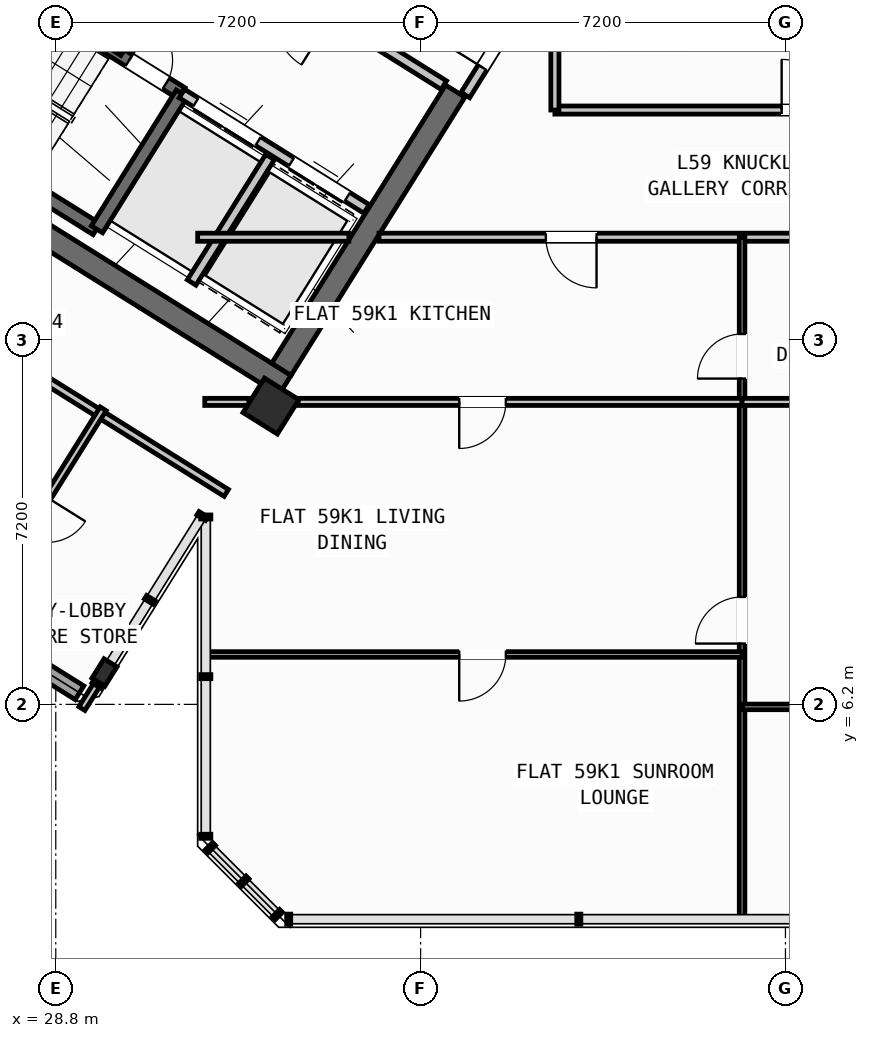
"""IFC4 building model, lengths in metres.
Left out: names, types, materials, properties, quantities, classifications, styles, units other than length and angle.
Written with IfcOpenShell. Run it as: python <this file> out.ifc"""

import sys

from ifc_helpers import new_model, si_unit, direction, frame, frame_2d, origin, origin_2d, place, context, subcontext, project, spatial, rectangle, hollow_rectangle, i_section, extrude, source, transform, mapped, element, fill, save


model = new_model("IFC4")
c1 = context("Model", 3, precision=1e-05, world=origin(), true_north=direction((0.0, 1.0)))
c2 = subcontext(c1, "Body", "Model", "MODEL_VIEW")
j1 = project(units=[si_unit("LENGTHUNIT", "METRE"), si_unit("PLANEANGLEUNIT", "RADIAN")], contexts=[c1])
p1 = place(None, origin())
s1 = spatial("IfcSite", under=j1, at=p1, CompositionType="ELEMENT")
p2 = place(p1, origin())
s2 = spatial("IfcBuilding", under=s1, at=p2, CompositionType="ELEMENT")
p3 = place(p2, frame((0.0, 0.0, 233.7)))
s3 = spatial("IfcBuildingStorey", under=s2, at=p3, CompositionType="ELEMENT", Elevation=233.7)
p4 = place(p3, frame((33.324, 12.503, 0.0), z_axis=(0.0, 0.0, 1.0), x_axis=(-0.848043529849, 0.529926571782, 0.0)))
e1 = element("IfcWall", 1, at=p4, inside=s3, PredefinedType="SHEAR", context=c2, shape_type="SweptSolid", body=[
    extrude(rectangle(XDim=13.04, YDim=0.45, at=frame_2d((6.52, 0.0))), origin(), (0.0, 0.0, 1.0), 4.55),
])
p5 = place(p3, frame((36.683, 18.304, 0.0), z_axis=(0.0, 0.0, 1.0), x_axis=(-0.529904039071, -0.848057609704, 0.0)))
e2 = element("IfcWall", 2, at=p5, inside=s3, PredefinedType="SHEAR", context=c2, shape_type="SweptSolid", body=[
    extrude(rectangle(XDim=6.475, YDim=0.45, at=frame_2d((3.238, 0.0))), origin(), (0.0, 0.0, 1.0), 4.55),
])
m1 = source(origin(), c2, "Body", "SweptSolid", [
    extrude(hollow_rectangle(XDim=0.8, YDim=0.8, WallThickness=0.032, at=origin_2d()), origin(), (0.0, 0.0, 1.0), 4.8),
])
p6 = place(p3, frame((33.046, 12.087, 0.0), z_axis=(0.0, 0.0, 1.0), x_axis=(-0.848048096156, 0.529919264233, 0.0)))
e3 = element("IfcColumn", 3, at=p6, inside=s3, PredefinedType="COLUMN", context=c2, shape_type="MappedRepresentation", body=[
    mapped(m1, transform((0.0, 0.0, 0.0), scale=1.0)),
])
m2 = source(origin(), c2, "Body", "SweptSolid", [
    extrude(i_section(OverallWidth=0.3, OverallDepth=0.45, WebThickness=0.014, FlangeThickness=0.026, at=origin_2d()), origin(), (0.0, 0.0, 1.0), 4.8),
])
p7 = place(p3, frame((29.761, 6.829, 0.0), z_axis=(0.0, 0.0, 1.0), x_axis=(-0.848048096156, 0.529919264233, 0.0)))
e4 = element("IfcColumn", 4, at=p7, inside=s3, PredefinedType="COLUMN", context=c2, shape_type="MappedRepresentation", body=[
    mapped(m2, transform((0.0, 0.0, 0.0), scale=1.0)),
])
p8 = place(p3, frame((29.268, 6.429, 0.0), z_axis=(0.0, 0.0, 1.0), x_axis=(-0.848049971435, 0.529916263149, 0.0)))
e5 = element("IfcWall", 5, at=p8, inside=s3, PredefinedType="STANDARD", context=c2, shape_type="SweptSolid", body=[
    extrude(rectangle(XDim=31.588, YDim=0.32, at=frame_2d((15.794, 0.0))), origin(), (0.0, 0.0, 1.0), 4.55),
])
p9 = place(p8, frame((15.901, 0.0, 0.0)))
e6 = element("IfcOpeningElement", 6, at=p9, cuts=e5, PredefinedType="OPENING", context=c2, shape_type="SweptSolid", body=[
    extrude(rectangle(XDim=1.2, YDim=2.15, at=frame_2d((0.6, 1.075))), frame((0.0, 0.17, 0.0), z_axis=(0.0, -1.0, 0.0), x_axis=(1.0, 0.0, 0.0)), (0.0, 0.0, 1.0), 0.34),
])
p10 = place(p8, frame((3.454, 0.0, 0.95)))
e7 = element("IfcOpeningElement", 7, at=p10, cuts=e5, PredefinedType="OPENING", context=c2, shape_type="SweptSolid", body=[
    extrude(rectangle(XDim=1.2, YDim=1.4, at=frame_2d((0.6, 0.7))), frame((0.0, 0.17, 0.0), z_axis=(0.0, -1.0, 0.0), x_axis=(1.0, 0.0, 0.0)), (0.0, 0.0, 1.0), 0.34),
])
p11 = place(p8, frame((7.561, 0.0, 0.85)))
e8 = element("IfcOpeningElement", 8, at=p11, cuts=e5, PredefinedType="OPENING", context=c2, shape_type="SweptSolid", body=[
    extrude(rectangle(XDim=1.8, YDim=1.5, at=frame_2d((0.9, 0.75))), frame((0.0, 0.17, 0.0), z_axis=(0.0, -1.0, 0.0), x_axis=(1.0, 0.0, 0.0)), (0.0, 0.0, 1.0), 0.34),
])
p12 = place(p8, frame((28.254, 0.0, 0.95)))
e9 = element("IfcOpeningElement", 9, at=p12, cuts=e5, PredefinedType="OPENING", context=c2, shape_type="SweptSolid", body=[
    extrude(rectangle(XDim=1.2, YDim=1.4, at=frame_2d((0.6, 0.7))), frame((0.0, 0.17, 0.0), z_axis=(0.0, -1.0, 0.0), x_axis=(1.0, 0.0, 0.0)), (0.0, 0.0, 1.0), 0.34),
])
p13 = place(p8, frame((19.234, 0.0, 1.0)))
e10 = element("IfcOpeningElement", 10, at=p13, cuts=e5, PredefinedType="OPENING", context=c2, shape_type="SweptSolid", body=[
    extrude(rectangle(XDim=0.9, YDim=1.25, at=frame_2d((0.45, 0.625))), frame((0.0, 0.17, 0.0), z_axis=(0.0, -1.0, 0.0), x_axis=(1.0, 0.0, 0.0)), (0.0, 0.0, 1.0), 0.34),
])
p14 = place(p8, frame((21.721, 0.0, 1.0)))
e11 = element("IfcOpeningElement", 11, at=p14, cuts=e5, PredefinedType="OPENING", context=c2, shape_type="SweptSolid", body=[
    extrude(rectangle(XDim=0.65, YDim=1.15, at=frame_2d((0.325, 0.575))), frame((0.0, 0.17, 0.0), z_axis=(0.0, -1.0, 0.0), x_axis=(1.0, 0.0, 0.0)), (0.0, 0.0, 1.0), 0.34),
])
p15 = place(p8, frame((23.631, 0.0, 1.0)))
e12 = element("IfcOpeningElement", 12, at=p15, cuts=e5, PredefinedType="OPENING", context=c2, shape_type="SweptSolid", body=[
    extrude(rectangle(XDim=0.9, YDim=1.25, at=frame_2d((0.45, 0.625))), frame((0.0, 0.17, 0.0), z_axis=(0.0, -1.0, 0.0), x_axis=(1.0, 0.0, 0.0)), (0.0, 0.0, 1.0), 0.34),
])
p16 = place(p8, frame((25.666, 0.0, 1.0)))
e13 = element("IfcOpeningElement", 13, at=p16, cuts=e5, PredefinedType="OPENING", context=c2, shape_type="SweptSolid", body=[
    extrude(rectangle(XDim=0.9, YDim=1.25, at=frame_2d((0.45, 0.625))), frame((0.0, 0.17, 0.0), z_axis=(0.0, -1.0, 0.0), x_axis=(1.0, 0.0, 0.0)), (0.0, 0.0, 1.0), 0.34),
])
p17 = place(p3, frame((29.605, 15.581, 0.0), z_axis=(0.0, 0.0, 1.0), x_axis=(-0.848036911448, 0.529937163087, 0.0)))
e14 = element("IfcWall", 14, at=p17, inside=s3, PredefinedType="SHEAR", context=c2, shape_type="SweptSolid", body=[
    extrude(rectangle(XDim=7.46, YDim=0.26, at=frame_2d((3.73, 0.0))), origin(), (0.0, 0.0, 1.0), 4.55),
])
p18 = place(p3, frame((31.28, 18.261, 0.0), z_axis=(0.0, 0.0, 1.0), x_axis=(-0.848051618787, 0.529913626805, 0.0)))
e15 = element("IfcWall", 15, at=p18, inside=s3, PredefinedType="SHEAR", context=c2, shape_type="SweptSolid", body=[
    extrude(rectangle(XDim=7.46, YDim=0.26, at=frame_2d((3.73, 0.0))), origin(), (0.0, 0.0, 1.0), 4.55),
])
p19 = place(p18, frame((0.36, 0.0, 0.0)))
e16 = element("IfcOpeningElement", 16, at=p19, cuts=e15, PredefinedType="OPENING", context=c2, shape_type="SweptSolid", body=[
    extrude(rectangle(XDim=0.86, YDim=2.05, at=frame_2d((0.43, 1.025))), frame((0.0, 0.14, 0.0), z_axis=(0.0, -1.0, 0.0), x_axis=(1.0, 0.0, 0.0)), (0.0, 0.0, 1.0), 0.28),
])
p20 = place(p3, frame((31.288, 18.256, 0.0), z_axis=(0.0, 0.0, 1.0), x_axis=(-0.529943379326, -0.848033026897, 0.0)))
e17 = element("IfcWall", 17, at=p20, inside=s3, PredefinedType="SHEAR", context=c2, shape_type="SweptSolid", body=[
    extrude(rectangle(XDim=3.16, YDim=0.26, at=frame_2d((1.58, 0.0))), origin(), (0.0, 0.0, 1.0), 4.55),
])
p21 = place(p3, frame((34.933, 15.978, 0.0), z_axis=(0.0, 0.0, 1.0), x_axis=(-0.848055739377, 0.529907032327, 0.0)))
e18 = element("IfcWall", 18, at=p21, inside=s3, PredefinedType="STANDARD", context=c2, shape_type="SweptSolid", body=[
    extrude(rectangle(XDim=4.298, YDim=0.2, at=frame_2d((2.149, 0.0))), origin(), (0.0, 0.0, 1.0), 4.54),
])
p22 = place(p21, frame((0.448, 0.0, 0.0)))
e19 = element("IfcOpeningElement", 19, at=p22, cuts=e18, PredefinedType="OPENING", context=c2, shape_type="SweptSolid", body=[
    extrude(rectangle(XDim=1.3, YDim=2.2, at=frame_2d((0.65, 1.1))), frame((0.0, 0.11, 0.0), z_axis=(0.0, -1.0, 0.0), x_axis=(1.0, 0.0, 0.0)), (0.0, 0.0, 1.0), 0.22),
])
p23 = place(p21, frame((2.523, 0.0, 0.0)))
e20 = element("IfcOpeningElement", 20, at=p23, cuts=e18, PredefinedType="OPENING", context=c2, shape_type="SweptSolid", body=[
    extrude(rectangle(XDim=1.45, YDim=2.25, at=frame_2d((0.725, 1.125))), frame((0.0, 0.11, 0.0), z_axis=(0.0, -1.0, 0.0), x_axis=(1.0, 0.0, 0.0)), (0.0, 0.0, 1.0), 0.22),
])
p24 = place(p3, frame((36.459, 18.421, 0.0), z_axis=(0.0, 0.0, 1.0), x_axis=(-0.848059591691, 0.529900867089, 0.0)))
e21 = element("IfcWall", 21, at=p24, inside=s3, PredefinedType="STANDARD", context=c2, shape_type="SweptSolid", body=[
    extrude(rectangle(XDim=5.818, YDim=0.2, at=frame_2d((2.909, 0.0))), origin(), (0.0, 0.0, 1.0), 4.54),
])
p25 = place(p24, frame((2.598, 0.0, 0.0)))
e22 = element("IfcOpeningElement", 22, at=p25, cuts=e21, PredefinedType="OPENING", context=c2, shape_type="SweptSolid", body=[
    extrude(rectangle(XDim=1.15, YDim=2.1, at=frame_2d((0.575, 1.05))), frame((0.0, 0.11, 0.0), z_axis=(0.0, -1.0, 0.0), x_axis=(1.0, 0.0, 0.0)), (0.0, 0.0, 1.0), 0.22),
])
p26 = place(p3, frame((33.029, 17.003, 0.0), z_axis=(0.0, 0.0, 1.0), x_axis=(-0.529916267533, -0.848049968695, 0.0)))
e23 = element("IfcWall", 23, at=p26, inside=s3, PredefinedType="STANDARD", context=c2, shape_type="SweptSolid", body=[
    extrude(rectangle(XDim=2.92, YDim=0.2, at=frame_2d((1.46, 0.0))), origin(), (0.0, 0.0, 1.0), 4.54),
])
p27 = place(p3, frame((31.525, 21.504, 0.0), z_axis=(0.0, 0.0, 1.0), x_axis=(-0.529907497854, -0.848055448493, 0.0)))
e24 = element("IfcWall", 24, at=p27, inside=s3, PredefinedType="STANDARD", context=c2, shape_type="SweptSolid", body=[
    extrude(rectangle(XDim=2.88, YDim=0.2, at=frame_2d((1.44, 0.0))), origin(), (0.0, 0.0, 1.0), 4.54),
])
p28 = place(p3, frame((32.164, 10.374, 0.0), z_axis=(0.0, 0.0, 1.0), x_axis=(-0.848044107957, 0.529925646633, 0.0)))
e25 = element("IfcWall", 25, at=p28, inside=s3, PredefinedType="PARTITIONING", context=c2, shape_type="SweptSolid", body=[
    extrude(rectangle(XDim=15.57, YDim=0.16, at=frame_2d((7.785, 0.0))), origin(), (0.0, 0.0, 1.0), 4.54),
])
p29 = place(p28, frame((4.1, 0.0, 0.0)))
e26 = element("IfcOpeningElement", 26, at=p29, cuts=e25, PredefinedType="OPENING", context=c2, shape_type="SweptSolid", body=[
    extrude(rectangle(XDim=0.96, YDim=2.08, at=frame_2d((0.48, 1.04))), frame((0.0, 0.09, 0.0), z_axis=(0.0, -1.0, 0.0), x_axis=(1.0, 0.0, 0.0)), (0.0, 0.0, 1.0), 0.18),
])
p30 = place(p28, frame((8.2, 0.0, 0.0)))
e27 = element("IfcOpeningElement", 27, at=p30, cuts=e25, PredefinedType="OPENING", context=c2, shape_type="SweptSolid", body=[
    extrude(rectangle(XDim=1.7, YDim=2.2, at=frame_2d((0.85, 1.1))), frame((0.0, 0.09, 0.0), z_axis=(0.0, -1.0, 0.0), x_axis=(1.0, 0.0, 0.0)), (0.0, 0.0, 1.0), 0.18),
])
p31 = place(p3, frame((29.735, 12.034, 0.0), z_axis=(0.0, 0.0, 1.0), x_axis=(-0.529890046623, -0.848066352646, 0.0)))
e28 = element("IfcWall", 28, at=p31, inside=s3, PredefinedType="PLUMBINGWALL", context=c2, shape_type="SweptSolid", body=[
    extrude(rectangle(XDim=5.24, YDim=0.14, at=frame_2d((2.62, 0.0))), origin(), (0.0, 0.0, 1.0), 4.54),
])
p32 = place(p31, frame((2.07, 0.0, 0.0)))
e29 = element("IfcOpeningElement", 29, at=p32, cuts=e28, PredefinedType="OPENING", context=c2, shape_type="SweptSolid", body=[
    extrude(rectangle(XDim=0.88, YDim=2.08, at=frame_2d((0.44, 1.04))), frame((0.0, 0.08, 0.0), z_axis=(0.0, -1.0, 0.0), x_axis=(1.0, 0.0, 0.0)), (0.0, 0.0, 1.0), 0.16),
])
p33 = place(p3, frame((29.635, 6.628, 0.0), z_axis=(0.0, 0.0, 1.0), x_axis=(-0.530071736977, -0.847952801551, 0.0)))
e30 = element("IfcWall", 30, at=p33, inside=s3, PredefinedType="PLUMBINGWALL", context=c2, shape_type="SweptSolid", body=[
    extrude(rectangle(XDim=0.603, YDim=0.14, at=frame_2d((0.301, 0.0))), origin(), (0.0, 0.0, 1.0), 4.54),
])
p34 = place(p3, frame((38.451, 20.737, 0.0), z_axis=(0.0, 0.0, 1.0), x_axis=(-0.529924799939, -0.848044637038, 0.0)))
e31 = element("IfcWall", 31, at=p34, inside=s3, PredefinedType="STANDARD", context=c2, shape_type="SweptSolid", body=[
    extrude(rectangle(XDim=2.96, YDim=0.2, at=frame_2d((1.48, 0.0))), origin(), (0.0, 0.0, 1.0), 4.54),
])
p35 = place(p34, frame((1.46, 0.0, 0.0)))
e32 = element("IfcOpeningElement", 32, at=p35, cuts=e31, PredefinedType="OPENING", context=c2, shape_type="SweptSolid", body=[
    extrude(rectangle(XDim=0.86, YDim=2.05, at=frame_2d((0.43, 1.025))), frame((0.0, 0.11, 0.0), z_axis=(0.0, -1.0, 0.0), x_axis=(1.0, 0.0, 0.0)), (0.0, 0.0, 1.0), 0.22),
])
p36 = place(p3, frame((31.6, 15.42, 0.0), z_axis=(0.0, 0.0, 1.0), x_axis=(1.0, 0.0, 0.0)))
e33 = element("IfcWall", 33, at=p36, inside=s3, PredefinedType="PARTITIONING", context=c2, shape_type="SweptSolid", body=[
    extrude(rectangle(XDim=2.984, YDim=0.16, at=frame_2d((1.492, 0.0))), origin(), (0.0, 0.0, 1.0), 4.54),
])
p37 = place(p3, frame((35.178, 15.42, 0.0), z_axis=(0.0, 0.0, 1.0), x_axis=(1.0, 0.0, 0.0)))
e34 = element("IfcWall", 34, at=p37, inside=s3, PredefinedType="PARTITIONING", context=c2, shape_type="SweptSolid", body=[
    extrude(rectangle(XDim=15.552, YDim=0.16, at=frame_2d((7.776, 0.0))), origin(), (0.0, 0.0, 1.0), 4.54),
])
p38 = place(p37, frame((3.294, 0.0, 0.0)))
e35 = element("IfcOpeningElement", 35, at=p38, cuts=e34, PredefinedType="OPENING", context=c2, shape_type="SweptSolid", body=[
    extrude(rectangle(XDim=1.0, YDim=2.1, at=frame_2d((0.5, 1.05))), frame((0.0, 0.09, 0.0), z_axis=(0.0, -1.0, 0.0), x_axis=(1.0, 0.0, 0.0)), (0.0, 0.0, 1.0), 0.18),
])
p39 = place(p3, frame((38.65, 17.93, 0.0), z_axis=(0.0, 0.0, 1.0), x_axis=(1.0, 0.0, 0.0)))
e36 = element("IfcWall", 36, at=p39, inside=s3, PredefinedType="PARTITIONING", context=c2, shape_type="SweptSolid", body=[
    extrude(rectangle(XDim=9.95, YDim=0.16, at=frame_2d((4.975, 0.0))), origin(), (0.0, 0.0, 1.0), 4.54),
])
p40 = place(p39, frame((4.475, 0.0, 0.0)))
e37 = element("IfcOpeningElement", 37, at=p40, cuts=e36, PredefinedType="OPENING", context=c2, shape_type="SweptSolid", body=[
    extrude(rectangle(XDim=1.0, YDim=2.1, at=frame_2d((0.5, 1.05))), frame((0.0, 0.09, 0.0), z_axis=(0.0, -1.0, 0.0), x_axis=(1.0, 0.0, 0.0)), (0.0, 0.0, 1.0), 0.18),
])
p41 = place(p3, frame((38.65, 17.93, 0.0), z_axis=(0.0, 0.0, 1.0), x_axis=(0.0, 1.0, 0.0)))
e38 = element("IfcWall", 38, at=p41, inside=s3, PredefinedType="PARTITIONING", context=c2, shape_type="SweptSolid", body=[
    extrude(rectangle(XDim=3.046, YDim=0.16, at=frame_2d((1.523, 0.0))), origin(), (0.0, 0.0, 1.0), 4.54),
])
p42 = place(p3, frame((42.344, 1.96, 0.0), z_axis=(0.0, 0.0, 1.0), x_axis=(0.0, 1.0, 0.0)))
e39 = element("IfcWall", 39, at=p42, inside=s3, PredefinedType="PARTITIONING", context=c2, shape_type="SweptSolid", body=[
    extrude(rectangle(XDim=13.46, YDim=0.11, at=frame_2d((6.73, 0.0))), origin(), (0.0, 0.0, 1.0), 4.54),
])
p43 = place(p42, frame((5.44, 0.0, 0.0)))
e40 = element("IfcOpeningElement", 40, at=p43, cuts=e39, PredefinedType="OPENING", context=c2, shape_type="SweptSolid", body=[
    extrude(rectangle(XDim=0.92, YDim=2.08, at=frame_2d((0.46, 1.04))), frame((0.0, 0.065, 0.0), z_axis=(0.0, -1.0, 0.0), x_axis=(1.0, 0.0, 0.0)), (0.0, 0.0, 1.0), 0.13),
])
p44 = place(p42, frame((10.67, 0.0, 0.0)))
e41 = element("IfcOpeningElement", 41, at=p44, cuts=e39, PredefinedType="OPENING", context=c2, shape_type="SweptSolid", body=[
    extrude(rectangle(XDim=0.88, YDim=2.08, at=frame_2d((0.44, 1.04))), frame((0.0, 0.065, 0.0), z_axis=(0.0, -1.0, 0.0), x_axis=(1.0, 0.0, 0.0)), (0.0, 0.0, 1.0), 0.13),
])
p45 = place(p3, frame((31.74, 12.17, 0.0), z_axis=(0.0, 0.0, 1.0), x_axis=(1.0, 0.0, 0.0)))
e42 = element("IfcWall", 42, at=p45, inside=s3, PredefinedType="PLUMBINGWALL", context=c2, shape_type="SweptSolid", body=[
    extrude(rectangle(XDim=0.872, YDim=0.14, at=frame_2d((0.436, 0.0))), origin(), (0.0, 0.0, 1.0), 4.54),
])
p46 = place(p3, frame((33.584, 12.17, 0.0), z_axis=(0.0, 0.0, 1.0), x_axis=(1.0, 0.0, 0.0)))
e43 = element("IfcWall", 43, at=p46, inside=s3, PredefinedType="PLUMBINGWALL", context=c2, shape_type="SweptSolid", body=[
    extrude(rectangle(XDim=8.76, YDim=0.14, at=frame_2d((4.38, 0.0))), origin(), (0.0, 0.0, 1.0), 3.725),
])
p47 = place(p46, frame((3.178, 0.0, 0.0)))
e44 = element("IfcOpeningElement", 44, at=p47, cuts=e43, PredefinedType="OPENING", context=c2, shape_type="SweptSolid", body=[
    extrude(rectangle(XDim=0.92, YDim=2.08, at=frame_2d((0.46, 1.04))), frame((0.0, 0.08, 0.0), z_axis=(0.0, -1.0, 0.0), x_axis=(1.0, 0.0, 0.0)), (0.0, 0.0, 1.0), 0.16),
])
p48 = place(p3, frame((42.344, 12.17, 0.0), z_axis=(0.0, 0.0, 1.0), x_axis=(1.0, 0.0, 0.0)))
e45 = element("IfcWall", 45, at=p48, inside=s3, PredefinedType="PLUMBINGWALL", context=c2, shape_type="SweptSolid", body=[
    extrude(rectangle(XDim=9.916, YDim=0.14, at=frame_2d((4.958, 0.0))), origin(), (0.0, 0.0, 1.0), 3.725),
])
p49 = place(p3, frame((31.74, 7.185, 0.0), z_axis=(0.0, 0.0, 1.0), x_axis=(1.0, 0.0, 0.0)))
e46 = element("IfcWall", 46, at=p49, inside=s3, PredefinedType="PARTITIONING", context=c2, shape_type="SweptSolid", body=[
    extrude(rectangle(XDim=10.604, YDim=0.11, at=frame_2d((5.302, 0.0))), origin(), (0.0, 0.0, 1.0), 4.54),
])
p50 = place(p49, frame((5.022, 0.0, 0.0)))
e47 = element("IfcOpeningElement", 47, at=p50, cuts=e46, PredefinedType="OPENING", context=c2, shape_type="SweptSolid", body=[
    extrude(rectangle(XDim=0.92, YDim=2.08, at=frame_2d((0.46, 1.04))), frame((0.0, 0.065, 0.0), z_axis=(0.0, -1.0, 0.0), x_axis=(1.0, 0.0, 0.0)), (0.0, 0.0, 1.0), 0.13),
])
p51 = place(p3, frame((42.344, 6.15, 0.0), z_axis=(0.0, 0.0, 1.0), x_axis=(1.0, 0.0, 0.0)))
e48 = element("IfcWall", 48, at=p51, inside=s3, PredefinedType="PARTITIONING", context=c2, shape_type="SweptSolid", body=[
    extrude(rectangle(XDim=9.916, YDim=0.11, at=frame_2d((4.958, 0.0))), origin(), (0.0, 0.0, 1.0), 4.54),
])
p52 = place(p51, frame((4.268, 0.0, 0.0)))
e49 = element("IfcOpeningElement", 49, at=p52, cuts=e48, PredefinedType="OPENING", context=c2, shape_type="SweptSolid", body=[
    extrude(rectangle(XDim=0.92, YDim=2.08, at=frame_2d((0.46, 1.04))), frame((0.0, 0.065, 0.0), z_axis=(0.0, -1.0, 0.0), x_axis=(1.0, 0.0, 0.0)), (0.0, 0.0, 1.0), 0.13),
])
m3 = source(origin(), c2, "Body", "SweptSolid", [
    extrude(rectangle(XDim=0.86, YDim=2.05, at=frame_2d((0.43, 1.025))), frame((0.0, 0.025, 0.0), z_axis=(0.0, -1.0, 0.0), x_axis=(1.0, 0.0, 0.0)), (0.0, 0.0, 1.0), 0.05),
])
p53 = place(p19, frame((0.86, 0.0, 0.0), z_axis=(0.0, 0.0, 1.0), x_axis=(-1.0, 0.0, 0.0)))
e50 = element("IfcDoor", 50, at=p53, inside=s3, OperationType="SINGLE_SWING_LEFT", PredefinedType="DOOR", context=c2, shape_type="MappedRepresentation", body=[
    mapped(m3, transform((0.0, 0.0, 0.0), scale=1.0)),
])
fill(e16, e50)
m4 = source(origin(), c2, "Body", "SweptSolid", [
    extrude(rectangle(XDim=1.3, YDim=2.2, at=frame_2d((0.65, 1.1))), frame((0.0, 0.025, 0.0), z_axis=(0.0, -1.0, 0.0), x_axis=(1.0, 0.0, 0.0)), (0.0, 0.0, 1.0), 0.05),
])
p54 = place(p22, origin())
e51 = element("IfcDoor", 51, at=p54, inside=s3, OperationType="DOUBLE_DOOR_SLIDING", PredefinedType="DOOR", context=c2, shape_type="MappedRepresentation", body=[
    mapped(m4, transform((0.0, 0.0, 0.0), scale=1.0)),
])
fill(e19, e51)
m5 = source(origin(), c2, "Body", "SweptSolid", [
    extrude(rectangle(XDim=1.45, YDim=2.25, at=frame_2d((0.725, 1.125))), frame((0.0, 0.025, 0.0), z_axis=(0.0, -1.0, 0.0), x_axis=(1.0, 0.0, 0.0)), (0.0, 0.0, 1.0), 0.05),
])
p55 = place(p23, origin())
e52 = element("IfcDoor", 52, at=p55, inside=s3, OperationType="DOUBLE_DOOR_SLIDING", PredefinedType="DOOR", context=c2, shape_type="MappedRepresentation", body=[
    mapped(m5, transform((0.0, 0.0, 0.0), scale=1.0)),
])
fill(e20, e52)
m6 = source(origin(), c2, "Body", "SweptSolid", [
    extrude(rectangle(XDim=1.0, YDim=2.1, at=frame_2d((0.5, 1.05))), frame((0.0, 0.025, 0.0), z_axis=(0.0, -1.0, 0.0), x_axis=(1.0, 0.0, 0.0)), (0.0, 0.0, 1.0), 0.05),
])
p56 = place(p40, origin())
e53 = element("IfcDoor", 53, at=p56, inside=s3, OperationType="SINGLE_SWING_LEFT", PredefinedType="DOOR", context=c2, shape_type="MappedRepresentation", body=[
    mapped(m6, transform((0.0, 0.0, 0.0), scale=1.0)),
])
fill(e37, e53)
p57 = place(p35, frame((0.86, 0.0, 0.0), z_axis=(0.0, 0.0, 1.0), x_axis=(-1.0, 0.0, 0.0)))
e54 = element("IfcDoor", 54, at=p57, inside=s3, OperationType="SINGLE_SWING_LEFT", PredefinedType="DOOR", context=c2, shape_type="MappedRepresentation", body=[
    mapped(m3, transform((0.0, 0.0, 0.0), scale=1.0)),
])
fill(e32, e54)
m7 = source(origin(), c2, "Body", "SweptSolid", [
    extrude(rectangle(XDim=0.92, YDim=2.08, at=frame_2d((0.46, 1.04))), frame((0.0, 0.025, 0.0), z_axis=(0.0, -1.0, 0.0), x_axis=(1.0, 0.0, 0.0)), (0.0, 0.0, 1.0), 0.05),
])
p58 = place(p50, frame((0.92, 0.0, 0.0), z_axis=(0.0, 0.0, 1.0), x_axis=(-1.0, 0.0, 0.0)))
e55 = element("IfcDoor", 55, at=p58, inside=s3, OperationType="SINGLE_SWING_RIGHT", PredefinedType="DOOR", context=c2, shape_type="MappedRepresentation", body=[
    mapped(m7, transform((0.0, 0.0, 0.0), scale=1.0)),
])
fill(e47, e55)
p59 = place(p43, origin())
e56 = element("IfcDoor", 56, at=p59, inside=s3, OperationType="SINGLE_SWING_LEFT", PredefinedType="DOOR", context=c2, shape_type="MappedRepresentation", body=[
    mapped(m7, transform((0.0, 0.0, 0.0), scale=1.0)),
])
fill(e40, e56)
p60 = place(p38, frame((1.0, 0.0, 0.0), z_axis=(0.0, 0.0, 1.0), x_axis=(-1.0, 0.0, 0.0)))
e57 = element("IfcDoor", 57, at=p60, inside=s3, OperationType="SINGLE_SWING_LEFT", PredefinedType="DOOR", context=c2, shape_type="MappedRepresentation", body=[
    mapped(m6, transform((0.0, 0.0, 0.0), scale=1.0)),
])
fill(e35, e57)
p61 = place(p47, frame((0.92, 0.0, 0.0), z_axis=(0.0, 0.0, 1.0), x_axis=(-1.0, 0.0, 0.0)))
e58 = element("IfcDoor", 58, at=p61, inside=s3, OperationType="SINGLE_SWING_RIGHT", PredefinedType="DOOR", context=c2, shape_type="MappedRepresentation", body=[
    mapped(m7, transform((0.0, 0.0, 0.0), scale=1.0)),
])
fill(e44, e58)
m8 = source(origin(), c2, "Body", "SweptSolid", [
    extrude(rectangle(XDim=0.88, YDim=2.08, at=frame_2d((0.44, 1.04))), frame((0.0, 0.025, 0.0), z_axis=(0.0, -1.0, 0.0), x_axis=(1.0, 0.0, 0.0)), (0.0, 0.0, 1.0), 0.05),
])
p62 = place(p44, origin())
e59 = element("IfcDoor", 59, at=p62, inside=s3, OperationType="SINGLE_SWING_LEFT", PredefinedType="DOOR", context=c2, shape_type="MappedRepresentation", body=[
    mapped(m8, transform((0.0, 0.0, 0.0), scale=1.0)),
])
fill(e41, e59)
save(model, sys.argv[1])
